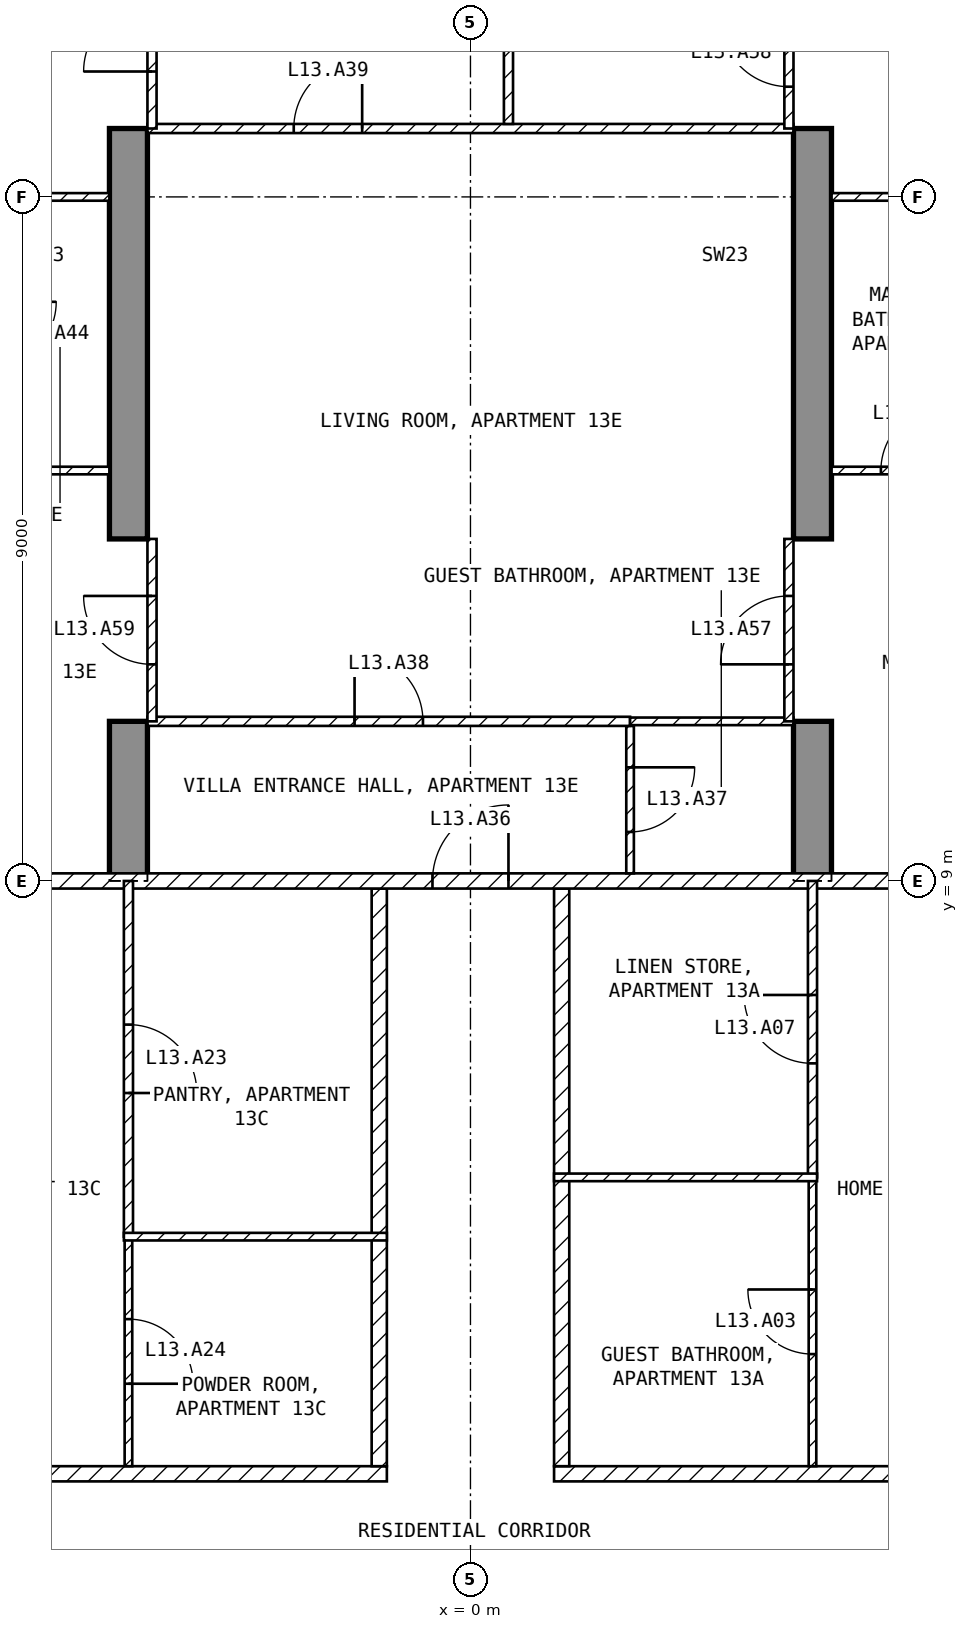
"""IFC4 building model, lengths in metres.
Left out: names, types, materials, properties, quantities, classifications, styles, units other than length and angle.
Written with IfcOpenShell. Run it as: python <this file> out.ifc"""

import sys

from ifc_helpers import new_model, si_unit, direction, frame, frame_2d, origin, place, context, subcontext, project, spatial, polyline, rectangle, outline, extrude, element, fill, save


model = new_model("IFC4")
c1 = context("Model", 3, precision=1e-05, world=origin(), true_north=direction((0.0, 1.0)))
c2 = subcontext(c1, "Body", "Model", "MODEL_VIEW")
j1 = project(units=[si_unit("LENGTHUNIT", "METRE"), si_unit("PLANEANGLEUNIT", "RADIAN")], contexts=[c1])
p1 = place(None, origin())
s1 = spatial("IfcSite", under=j1, at=p1, CompositionType="ELEMENT")
p2 = place(p1, origin())
s2 = spatial("IfcBuilding", under=s1, at=p2, CompositionType="ELEMENT")
p3 = place(p2, frame((0.0, 0.0, 64.5)))
s3 = spatial("IfcBuildingStorey", under=s2, at=p3, CompositionType="ELEMENT", Elevation=64.5)
for number, where, z_axis, x_axis in (
    (1, (-4.75, 9.0, -0.25), (1.0, 0.0, 0.0), (0.0, 1.0, 0.0)),
    (2, (4.25, 9.0, -0.25), (1.0, 0.0, 0.0), (0.0, 1.0, 0.0)),
):
    element("IfcWall", number, at=place(p3, frame(where, z_axis=z_axis, x_axis=x_axis)), inside=s3, PredefinedType="SHEAR", context=c2, shape_type="SweptSolid", body=[
        extrude(outline(polyline([(0.0, 0.0), (2.1, 0.0), (2.1, 2.65), (4.5, 2.65), (4.5, 0.0), (9.9, 0.0), (9.9, 2.65), (12.3, 2.65), (12.3, 0.0), (16.45, 0.0), (16.45, 3.5), (0.0, 3.5), (0.0, 0.0)])), origin(), (0.0, 0.0, 1.0), 0.5),
    ])
p4 = place(p3, frame((1.1, 1.2, 0.0), z_axis=(0.0, 0.0, 1.0), x_axis=(1.0, 0.0, 0.0)))
e3 = element("IfcWall", 3, at=p4, inside=s3, PredefinedType="PARTITIONING", context=c2, shape_type="SweptSolid", body=[
    extrude(rectangle(XDim=20.5, YDim=0.2, at=frame_2d((10.25, 0.0))), origin(), (0.0, 0.0, 1.0), 3.25),
])
p5 = place(p4, frame((9.2, 0.0, 0.0)))
e4 = element("IfcOpeningElement", 4, at=p5, cuts=e3, PredefinedType="OPENING", context=c2, shape_type="SweptSolid", body=[
    extrude(rectangle(XDim=1.0, YDim=2.1, at=frame_2d((0.5, 1.05))), frame((0.0, 0.11, 0.0), z_axis=(0.0, -1.0, 0.0), x_axis=(1.0, 0.0, 0.0)), (0.0, 0.0, 1.0), 0.22),
])
p6 = place(p3, frame((1.2, 8.9, 0.0), z_axis=(0.0, 0.0, 1.0), x_axis=(0.0, -1.0, 0.0)))
e5 = element("IfcWall", 5, at=p6, inside=s3, PredefinedType="PARTITIONING", context=c2, shape_type="SweptSolid", body=[
    extrude(rectangle(XDim=7.6, YDim=0.2, at=frame_2d((3.8, 0.0))), origin(), (0.0, 0.0, 1.0), 3.25),
])
p7 = place(p3, frame((-21.6, 1.2, 0.0), z_axis=(0.0, 0.0, 1.0), x_axis=(1.0, 0.0, 0.0)))
e6 = element("IfcWall", 6, at=p7, inside=s3, PredefinedType="PARTITIONING", context=c2, shape_type="SweptSolid", body=[
    extrude(rectangle(XDim=20.5, YDim=0.2, at=frame_2d((10.25, 0.0))), origin(), (0.0, 0.0, 1.0), 3.25),
])
p8 = place(p7, frame((10.3, 0.0, 0.0)))
e7 = element("IfcOpeningElement", 7, at=p8, cuts=e6, PredefinedType="OPENING", context=c2, shape_type="SweptSolid", body=[
    extrude(rectangle(XDim=1.0, YDim=2.1, at=frame_2d((0.5, 1.05))), frame((0.0, 0.11, 0.0), z_axis=(0.0, -1.0, 0.0), x_axis=(1.0, 0.0, 0.0)), (0.0, 0.0, 1.0), 0.22),
])
p9 = place(p3, frame((-1.2, 1.3, 0.0), z_axis=(0.0, 0.0, 1.0), x_axis=(0.0, 1.0, 0.0)))
e8 = element("IfcWall", 8, at=p9, inside=s3, PredefinedType="PARTITIONING", context=c2, shape_type="SweptSolid", body=[
    extrude(rectangle(XDim=7.6, YDim=0.2, at=frame_2d((3.8, 0.0))), origin(), (0.0, 0.0, 1.0), 3.25),
])
p10 = place(p3, frame((-8.92, 9.0, 0.0), z_axis=(0.0, 0.0, 1.0), x_axis=(1.0, 0.0, 0.0)))
e9 = element("IfcWall", 9, at=p10, inside=s3, PredefinedType="PARTITIONING", context=c2, shape_type="SweptSolid", body=[
    extrude(rectangle(XDim=17.84, YDim=0.2, at=frame_2d((8.92, 0.0))), origin(), (0.0, 0.0, 1.0), 3.25),
])
p11 = place(p10, frame((8.42, 0.0, 0.0)))
e10 = element("IfcOpeningElement", 10, at=p11, cuts=e9, PredefinedType="OPENING", context=c2, shape_type="SweptSolid", body=[
    extrude(rectangle(XDim=1.0, YDim=2.1, at=frame_2d((0.5, 1.05))), frame((0.0, 0.11, 0.0), z_axis=(0.0, -1.0, 0.0), x_axis=(1.0, 0.0, 0.0)), (0.0, 0.0, 1.0), 0.22),
])
p12 = place(p3, frame((4.5, 1.3, 0.0), z_axis=(0.0, 0.0, 1.0), x_axis=(0.0, 1.0, 0.0)))
e11 = element("IfcWall", 11, at=p12, inside=s3, PredefinedType="PARTITIONING", context=c2, shape_type="SweptSolid", body=[
    extrude(rectangle(XDim=3.8, YDim=0.1, at=frame_2d((1.9, 0.0))), origin(), (0.0, 0.0, 1.0), 3.25),
])
p13 = place(p12, frame((1.475, 0.0, 0.0)))
e12 = element("IfcOpeningElement", 12, at=p13, cuts=e11, PredefinedType="OPENING", context=c2, shape_type="SweptSolid", body=[
    extrude(rectangle(XDim=0.85, YDim=2.1, at=frame_2d((0.425, 1.05))), frame((0.0, 0.06, 0.0), z_axis=(0.0, -1.0, 0.0), x_axis=(1.0, 0.0, 0.0)), (0.0, 0.0, 1.0), 0.12),
])
p14 = place(p3, frame((4.5, 5.1, 0.0), z_axis=(0.0, 0.0, 1.0), x_axis=(0.0, 1.0, 0.0)))
e13 = element("IfcWall", 13, at=p14, inside=s3, PredefinedType="PARTITIONING", context=c2, shape_type="SweptSolid", body=[
    extrude(rectangle(XDim=3.9, YDim=0.12, at=frame_2d((1.95, 0.0))), origin(), (0.0, 0.0, 1.0), 3.25),
])
p15 = place(p14, frame((1.5, 0.0, 0.0)))
e14 = element("IfcOpeningElement", 14, at=p15, cuts=e13, PredefinedType="OPENING", context=c2, shape_type="SweptSolid", body=[
    extrude(rectangle(XDim=0.9, YDim=2.1, at=frame_2d((0.45, 1.05))), frame((0.0, 0.07, 0.0), z_axis=(0.0, -1.0, 0.0), x_axis=(1.0, 0.0, 0.0)), (0.0, 0.0, 1.0), 0.14),
])
p16 = place(p3, frame((1.1, 5.1, 0.0), z_axis=(0.0, 0.0, 1.0), x_axis=(1.0, 0.0, 0.0)))
e15 = element("IfcWall", 15, at=p16, inside=s3, PredefinedType="PARTITIONING", context=c2, shape_type="SweptSolid", body=[
    extrude(rectangle(XDim=3.46, YDim=0.1, at=frame_2d((1.73, 0.0))), origin(), (0.0, 0.0, 1.0), 3.25),
])
p17 = place(p3, frame((-4.5, 4.32, 0.0), z_axis=(0.0, 0.0, 1.0), x_axis=(0.0, -1.0, 0.0)))
e16 = element("IfcWall", 16, at=p17, inside=s3, PredefinedType="PARTITIONING", context=c2, shape_type="SweptSolid", body=[
    extrude(rectangle(XDim=3.02, YDim=0.1, at=frame_2d((1.51, 0.0))), origin(), (0.0, 0.0, 1.0), 3.25),
])
p18 = place(p17, frame((1.085, 0.0, 0.0)))
e17 = element("IfcOpeningElement", 17, at=p18, cuts=e16, PredefinedType="OPENING", context=c2, shape_type="SweptSolid", body=[
    extrude(rectangle(XDim=0.85, YDim=2.1, at=frame_2d((0.425, 1.05))), frame((0.0, 0.06, 0.0), z_axis=(0.0, -1.0, 0.0), x_axis=(1.0, 0.0, 0.0)), (0.0, 0.0, 1.0), 0.12),
])
p19 = place(p3, frame((-4.5, 9.0, 0.0), z_axis=(0.0, 0.0, 1.0), x_axis=(0.0, -1.0, 0.0)))
e18 = element("IfcWall", 18, at=p19, inside=s3, PredefinedType="PARTITIONING", context=c2, shape_type="SweptSolid", body=[
    extrude(rectangle(XDim=4.68, YDim=0.12, at=frame_2d((2.34, 0.0))), origin(), (0.0, 0.0, 1.0), 3.25),
])
p20 = place(p19, frame((1.89, 0.0, 0.0)))
e19 = element("IfcOpeningElement", 19, at=p20, cuts=e18, PredefinedType="OPENING", context=c2, shape_type="SweptSolid", body=[
    extrude(rectangle(XDim=0.9, YDim=2.1, at=frame_2d((0.45, 1.05))), frame((0.0, 0.07, 0.0), z_axis=(0.0, -1.0, 0.0), x_axis=(1.0, 0.0, 0.0)), (0.0, 0.0, 1.0), 0.14),
])
p21 = place(p3, frame((-4.56, 4.32, 0.0), z_axis=(0.0, 0.0, 1.0), x_axis=(1.0, 0.0, 0.0)))
e20 = element("IfcWall", 20, at=p21, inside=s3, PredefinedType="PARTITIONING", context=c2, shape_type="SweptSolid", body=[
    extrude(rectangle(XDim=3.46, YDim=0.1, at=frame_2d((1.73, 0.0))), origin(), (0.0, 0.0, 1.0), 3.25),
])
p22 = place(p3, frame((2.1, 11.04, 0.0), z_axis=(0.0, 0.0, 1.0), x_axis=(0.0, -1.0, 0.0)))
e21 = element("IfcWall", 21, at=p22, inside=s3, PredefinedType="PARTITIONING", context=c2, shape_type="SweptSolid", body=[
    extrude(rectangle(XDim=1.94, YDim=0.1, at=frame_2d((0.97, 0.0))), origin(), (0.0, 0.0, 1.0), 3.25),
])
p23 = place(p22, frame((0.545, 0.0, 0.0)))
e22 = element("IfcOpeningElement", 22, at=p23, cuts=e21, PredefinedType="OPENING", context=c2, shape_type="SweptSolid", body=[
    extrude(rectangle(XDim=0.85, YDim=2.1, at=frame_2d((0.425, 1.05))), frame((0.0, 0.06, 0.0), z_axis=(0.0, -1.0, 0.0), x_axis=(1.0, 0.0, 0.0)), (0.0, 0.0, 1.0), 0.12),
])
p24 = place(p3, frame((-4.25, 11.1, 0.0), z_axis=(0.0, 0.0, 1.0), x_axis=(1.0, 0.0, 0.0)))
e23 = element("IfcWall", 23, at=p24, inside=s3, PredefinedType="PARTITIONING", context=c2, shape_type="SweptSolid", body=[
    extrude(rectangle(XDim=6.35, YDim=0.12, at=frame_2d((3.175, 0.0))), origin(), (0.0, 0.0, 1.0), 3.25),
])
p25 = place(p24, frame((2.725, 0.0, 0.0)))
e24 = element("IfcOpeningElement", 24, at=p25, cuts=e23, PredefinedType="OPENING", context=c2, shape_type="SweptSolid", body=[
    extrude(rectangle(XDim=0.9, YDim=2.1, at=frame_2d((0.45, 1.05))), frame((0.0, 0.07, 0.0), z_axis=(0.0, -1.0, 0.0), x_axis=(1.0, 0.0, 0.0)), (0.0, 0.0, 1.0), 0.14),
])
p26 = place(p3, frame((2.1, 11.1, 0.0), z_axis=(0.0, 0.0, 1.0), x_axis=(1.0, 0.0, 0.0)))
e25 = element("IfcWall", 25, at=p26, inside=s3, PredefinedType="PARTITIONING", context=c2, shape_type="SweptSolid", body=[
    extrude(rectangle(XDim=2.15, YDim=0.1, at=frame_2d((1.075, 0.0))), origin(), (0.0, 0.0, 1.0), 3.25),
])
p27 = place(p3, frame((-4.25, 18.9, 0.0), z_axis=(0.0, 0.0, 1.0), x_axis=(1.0, 0.0, 0.0)))
e26 = element("IfcWall", 26, at=p27, inside=s3, PredefinedType="PARTITIONING", context=c2, shape_type="SweptSolid", body=[
    extrude(rectangle(XDim=8.5, YDim=0.12, at=frame_2d((4.25, 0.0))), origin(), (0.0, 0.0, 1.0), 3.25),
])
p28 = place(p27, frame((1.925, 0.0, 0.0)))
e27 = element("IfcOpeningElement", 27, at=p28, cuts=e26, PredefinedType="OPENING", context=c2, shape_type="SweptSolid", body=[
    extrude(rectangle(XDim=0.9, YDim=2.1, at=frame_2d((0.45, 1.05))), frame((0.0, 0.07, 0.0), z_axis=(0.0, -1.0, 0.0), x_axis=(1.0, 0.0, 0.0)), (0.0, 0.0, 1.0), 0.14),
])
p29 = place(p3, frame((0.5, 23.34, 0.0), z_axis=(0.0, 0.0, 1.0), x_axis=(0.0, -1.0, 0.0)))
e28 = element("IfcWall", 28, at=p29, inside=s3, PredefinedType="PARTITIONING", context=c2, shape_type="SweptSolid", body=[
    extrude(rectangle(XDim=4.38, YDim=0.12, at=frame_2d((2.19, 0.0))), origin(), (0.0, 0.0, 1.0), 3.25),
])
p30 = place(p29, frame((1.74, 0.0, 0.0)))
e29 = element("IfcOpeningElement", 29, at=p30, cuts=e28, PredefinedType="OPENING", context=c2, shape_type="SweptSolid", body=[
    extrude(rectangle(XDim=0.9, YDim=2.1, at=frame_2d((0.45, 1.05))), frame((0.0, 0.07, 0.0), z_axis=(0.0, -1.0, 0.0), x_axis=(1.0, 0.0, 0.0)), (0.0, 0.0, 1.0), 0.14),
])
p31 = place(p3, frame((4.75, 14.4, 0.0), z_axis=(0.0, 0.0, 1.0), x_axis=(1.0, 0.0, 0.0)))
e30 = element("IfcWall", 30, at=p31, inside=s3, PredefinedType="PARTITIONING", context=c2, shape_type="SweptSolid", body=[
    extrude(rectangle(XDim=2.2, YDim=0.1, at=frame_2d((1.1, 0.0))), origin(), (0.0, 0.0, 1.0), 3.25),
])
p32 = place(p31, frame((0.65, 0.0, 0.0)))
e31 = element("IfcOpeningElement", 31, at=p32, cuts=e30, PredefinedType="OPENING", context=c2, shape_type="SweptSolid", body=[
    extrude(rectangle(XDim=0.85, YDim=2.1, at=frame_2d((0.425, 1.05))), frame((0.0, 0.06, 0.0), z_axis=(0.0, -1.0, 0.0), x_axis=(1.0, 0.0, 0.0)), (0.0, 0.0, 1.0), 0.12),
])
p33 = place(p3, frame((4.75, 18.0, 0.0), z_axis=(0.0, 0.0, 1.0), x_axis=(1.0, 0.0, 0.0)))
e32 = element("IfcWall", 32, at=p33, inside=s3, PredefinedType="PARTITIONING", context=c2, shape_type="SweptSolid", body=[
    extrude(rectangle(XDim=2.15, YDim=0.1, at=frame_2d((1.075, 0.0))), origin(), (0.0, 0.0, 1.0), 2.346),
])
p34 = place(p3, frame((-6.35, 14.4, 0.0), z_axis=(0.0, 0.0, 1.0), x_axis=(1.0, 0.0, 0.0)))
e33 = element("IfcWall", 33, at=p34, inside=s3, PredefinedType="PARTITIONING", context=c2, shape_type="SweptSolid", body=[
    extrude(rectangle(XDim=1.6, YDim=0.1, at=frame_2d((0.8, 0.0))), origin(), (0.0, 0.0, 1.0), 3.25),
])
p35 = place(p3, frame((-6.3, 18.0, 0.0), z_axis=(0.0, 0.0, 1.0), x_axis=(1.0, 0.0, 0.0)))
e34 = element("IfcWall", 34, at=p35, inside=s3, PredefinedType="PARTITIONING", context=c2, shape_type="SweptSolid", body=[
    extrude(rectangle(XDim=1.55, YDim=0.1, at=frame_2d((0.775, 0.0))), origin(), (0.0, 0.0, 1.0), 2.346),
])
p36 = place(p3, frame((4.19, 11.1, 0.0), z_axis=(0.0, 0.0, 1.0), x_axis=(0.0, 1.0, 0.0)))
e35 = element("IfcWall", 35, at=p36, inside=s3, PredefinedType="PARTITIONING", context=c2, shape_type="SweptSolid", body=[
    extrude(rectangle(XDim=2.4, YDim=0.12, at=frame_2d((1.2, 0.0))), origin(), (0.0, 0.0, 1.0), 2.4),
])
p37 = place(p36, frame((0.75, 0.0, 0.0)))
e36 = element("IfcOpeningElement", 36, at=p37, cuts=e35, PredefinedType="OPENING", context=c2, shape_type="SweptSolid", body=[
    extrude(rectangle(XDim=0.9, YDim=2.1, at=frame_2d((0.45, 1.05))), frame((0.0, 0.07, 0.0), z_axis=(0.0, -1.0, 0.0), x_axis=(1.0, 0.0, 0.0)), (0.0, 0.0, 1.0), 0.14),
])
p38 = place(p3, frame((4.19, 18.9, 0.0), z_axis=(0.0, 0.0, 1.0), x_axis=(0.0, 1.0, 0.0)))
e37 = element("IfcWall", 37, at=p38, inside=s3, PredefinedType="PARTITIONING", context=c2, shape_type="SweptSolid", body=[
    extrude(rectangle(XDim=2.4, YDim=0.12, at=frame_2d((1.2, 0.0))), origin(), (0.0, 0.0, 1.0), 2.4),
])
p39 = place(p38, frame((0.55, 0.0, 0.0)))
e38 = element("IfcOpeningElement", 38, at=p39, cuts=e37, PredefinedType="OPENING", context=c2, shape_type="SweptSolid", body=[
    extrude(rectangle(XDim=0.9, YDim=2.1, at=frame_2d((0.45, 1.05))), frame((0.0, 0.07, 0.0), z_axis=(0.0, -1.0, 0.0), x_axis=(1.0, 0.0, 0.0)), (0.0, 0.0, 1.0), 0.14),
])
p40 = place(p3, frame((-4.19, 11.1, 0.0), z_axis=(0.0, 0.0, 1.0), x_axis=(0.0, 1.0, 0.0)))
e39 = element("IfcWall", 39, at=p40, inside=s3, PredefinedType="PARTITIONING", context=c2, shape_type="SweptSolid", body=[
    extrude(rectangle(XDim=2.4, YDim=0.12, at=frame_2d((1.2, 0.0))), origin(), (0.0, 0.0, 1.0), 2.4),
])
p41 = place(p40, frame((0.75, 0.0, 0.0)))
e40 = element("IfcOpeningElement", 40, at=p41, cuts=e39, PredefinedType="OPENING", context=c2, shape_type="SweptSolid", body=[
    extrude(rectangle(XDim=0.9, YDim=2.1, at=frame_2d((0.45, 1.05))), frame((0.0, 0.07, 0.0), z_axis=(0.0, -1.0, 0.0), x_axis=(1.0, 0.0, 0.0)), (0.0, 0.0, 1.0), 0.14),
])
p42 = place(p3, frame((-4.19, 18.9, 0.0), z_axis=(0.0, 0.0, 1.0), x_axis=(0.0, 1.0, 0.0)))
e41 = element("IfcWall", 41, at=p42, inside=s3, PredefinedType="PARTITIONING", context=c2, shape_type="SweptSolid", body=[
    extrude(rectangle(XDim=2.4, YDim=0.12, at=frame_2d((1.2, 0.0))), origin(), (0.0, 0.0, 1.0), 2.4),
])
p43 = place(p42, frame((0.75, 0.0, 0.0)))
e42 = element("IfcOpeningElement", 42, at=p43, cuts=e41, PredefinedType="OPENING", context=c2, shape_type="SweptSolid", body=[
    extrude(rectangle(XDim=0.9, YDim=2.1, at=frame_2d((0.45, 1.05))), frame((0.0, 0.07, 0.0), z_axis=(0.0, -1.0, 0.0), x_axis=(1.0, 0.0, 0.0)), (0.0, 0.0, 1.0), 0.14),
])
p44 = place(p13, origin())
e43 = element("IfcDoor", 43, at=p44, inside=s3, OperationType="SINGLE_SWING_RIGHT", PredefinedType="DOOR", context=c2, shape_type="SweptSolid", body=[
    extrude(rectangle(XDim=0.85, YDim=2.1, at=frame_2d((0.425, 1.05))), frame((0.0, 0.025, 0.0), z_axis=(0.0, -1.0, 0.0), x_axis=(1.0, 0.0, 0.0)), (0.0, 0.0, 1.0), 0.05),
])
fill(e12, e43)
p45 = place(p15, origin())
e44 = element("IfcDoor", 44, at=p45, inside=s3, OperationType="SINGLE_SWING_RIGHT", PredefinedType="DOOR", context=c2, shape_type="SweptSolid", body=[
    extrude(rectangle(XDim=0.9, YDim=2.1, at=frame_2d((0.45, 1.05))), frame((0.0, 0.025, 0.0), z_axis=(0.0, -1.0, 0.0), x_axis=(1.0, 0.0, 0.0)), (0.0, 0.0, 1.0), 0.05),
])
fill(e14, e44)
p46 = place(p20, origin())
e45 = element("IfcDoor", 45, at=p46, inside=s3, OperationType="SINGLE_SWING_RIGHT", PredefinedType="DOOR", context=c2, shape_type="SweptSolid", body=[
    extrude(rectangle(XDim=0.9, YDim=2.1, at=frame_2d((0.45, 1.05))), frame((0.0, 0.025, 0.0), z_axis=(0.0, -1.0, 0.0), x_axis=(1.0, 0.0, 0.0)), (0.0, 0.0, 1.0), 0.05),
])
fill(e19, e45)
p47 = place(p18, origin())
e46 = element("IfcDoor", 46, at=p47, inside=s3, OperationType="SINGLE_SWING_RIGHT", PredefinedType="DOOR", context=c2, shape_type="SweptSolid", body=[
    extrude(rectangle(XDim=0.85, YDim=2.1, at=frame_2d((0.425, 1.05))), frame((0.0, 0.025, 0.0), z_axis=(0.0, -1.0, 0.0), x_axis=(1.0, 0.0, 0.0)), (0.0, 0.0, 1.0), 0.05),
])
fill(e17, e46)
p48 = place(p11, origin())
e47 = element("IfcDoor", 47, at=p48, inside=s3, OperationType="SINGLE_SWING_RIGHT", PredefinedType="DOOR", context=c2, shape_type="SweptSolid", body=[
    extrude(rectangle(XDim=1.0, YDim=2.1, at=frame_2d((0.5, 1.05))), frame((0.0, 0.025, 0.0), z_axis=(0.0, -1.0, 0.0), x_axis=(1.0, 0.0, 0.0)), (0.0, 0.0, 1.0), 0.05),
])
fill(e10, e47)
p49 = place(p23, origin())
e48 = element("IfcDoor", 48, at=p49, inside=s3, OperationType="SINGLE_SWING_LEFT", PredefinedType="DOOR", context=c2, shape_type="SweptSolid", body=[
    extrude(rectangle(XDim=0.85, YDim=2.1, at=frame_2d((0.425, 1.05))), frame((0.0, 0.025, 0.0), z_axis=(0.0, -1.0, 0.0), x_axis=(1.0, 0.0, 0.0)), (0.0, 0.0, 1.0), 0.05),
])
fill(e22, e48)
p50 = place(p25, origin())
e49 = element("IfcDoor", 49, at=p50, inside=s3, OperationType="SINGLE_SWING_LEFT", PredefinedType="DOOR", context=c2, shape_type="SweptSolid", body=[
    extrude(rectangle(XDim=0.9, YDim=2.1, at=frame_2d((0.45, 1.05))), frame((0.0, 0.025, 0.0), z_axis=(0.0, -1.0, 0.0), x_axis=(1.0, 0.0, 0.0)), (0.0, 0.0, 1.0), 0.05),
])
fill(e24, e49)
p51 = place(p28, origin())
e50 = element("IfcDoor", 50, at=p51, inside=s3, OperationType="SINGLE_SWING_RIGHT", PredefinedType="DOOR", context=c2, shape_type="SweptSolid", body=[
    extrude(rectangle(XDim=0.9, YDim=2.1, at=frame_2d((0.45, 1.05))), frame((0.0, 0.025, 0.0), z_axis=(0.0, -1.0, 0.0), x_axis=(1.0, 0.0, 0.0)), (0.0, 0.0, 1.0), 0.05),
])
fill(e27, e50)
p52 = place(p32, origin())
e51 = element("IfcDoor", 51, at=p52, inside=s3, OperationType="SINGLE_SWING_RIGHT", PredefinedType="DOOR", context=c2, shape_type="SweptSolid", body=[
    extrude(rectangle(XDim=0.85, YDim=2.1, at=frame_2d((0.425, 1.05))), frame((0.0, 0.025, 0.0), z_axis=(0.0, -1.0, 0.0), x_axis=(1.0, 0.0, 0.0)), (0.0, 0.0, 1.0), 0.05),
])
fill(e31, e51)
p53 = place(p37, origin())
e52 = element("IfcDoor", 52, at=p53, inside=s3, OperationType="SINGLE_SWING_LEFT", PredefinedType="DOOR", context=c2, shape_type="SweptSolid", body=[
    extrude(rectangle(XDim=0.9, YDim=2.1, at=frame_2d((0.45, 1.05))), frame((0.0, 0.025, 0.0), z_axis=(0.0, -1.0, 0.0), x_axis=(1.0, 0.0, 0.0)), (0.0, 0.0, 1.0), 0.05),
])
fill(e36, e52)
p54 = place(p39, origin())
e53 = element("IfcDoor", 53, at=p54, inside=s3, OperationType="SINGLE_SWING_RIGHT", PredefinedType="DOOR", context=c2, shape_type="SweptSolid", body=[
    extrude(rectangle(XDim=0.9, YDim=2.1, at=frame_2d((0.45, 1.05))), frame((0.0, 0.025, 0.0), z_axis=(0.0, -1.0, 0.0), x_axis=(1.0, 0.0, 0.0)), (0.0, 0.0, 1.0), 0.05),
])
fill(e38, e53)
p55 = place(p41, origin())
e54 = element("IfcDoor", 54, at=p55, inside=s3, OperationType="SINGLE_SWING_RIGHT", PredefinedType="DOOR", context=c2, shape_type="SweptSolid", body=[
    extrude(rectangle(XDim=0.9, YDim=2.1, at=frame_2d((0.45, 1.05))), frame((0.0, 0.025, 0.0), z_axis=(0.0, -1.0, 0.0), x_axis=(1.0, 0.0, 0.0)), (0.0, 0.0, 1.0), 0.05),
])
fill(e40, e54)
p56 = place(p43, origin())
e55 = element("IfcDoor", 55, at=p56, inside=s3, OperationType="SINGLE_SWING_LEFT", PredefinedType="DOOR", context=c2, shape_type="SweptSolid", body=[
    extrude(rectangle(XDim=0.9, YDim=2.1, at=frame_2d((0.45, 1.05))), frame((0.0, 0.025, 0.0), z_axis=(0.0, -1.0, 0.0), x_axis=(1.0, 0.0, 0.0)), (0.0, 0.0, 1.0), 0.05),
])
fill(e42, e55)
save(model, sys.argv[1])
